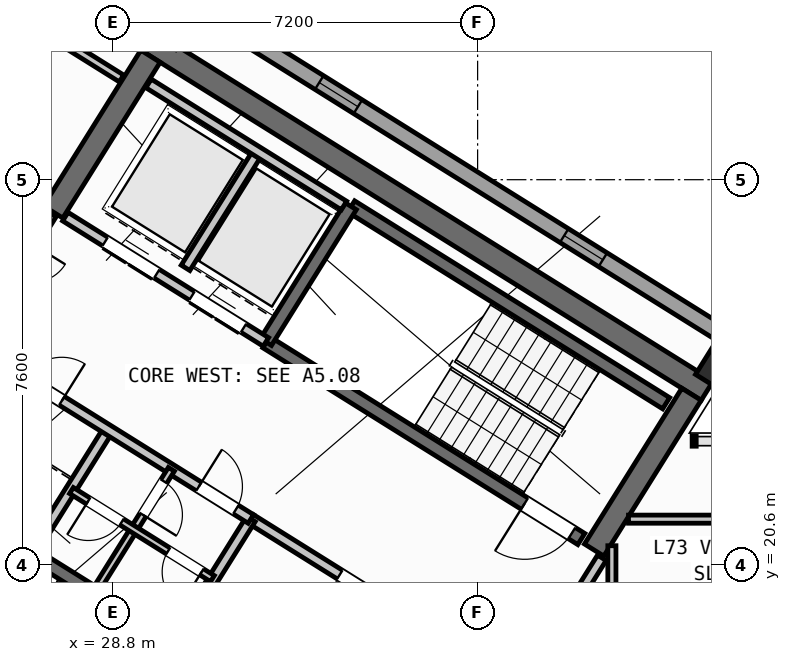
"""IFC4 building model, lengths in metres.
Left out: names, types, materials, properties, quantities, classifications, styles, units other than length and angle.
Written with IfcOpenShell. Run it as: python <this file> out.ifc"""

import sys

from ifc_helpers import new_model, si_unit, direction, frame, frame_2d, origin, origin_2d, place, context, subcontext, project, spatial, rectangle, hollow_rectangle, extrude, source, transform, mapped, element, fill, save


model = new_model("IFC4")
c1 = context("Model", 3, precision=1e-05, world=origin(), true_north=direction((0.0, 1.0)))
c2 = subcontext(c1, "Body", "Model", "MODEL_VIEW")
j1 = project(units=[si_unit("LENGTHUNIT", "METRE"), si_unit("PLANEANGLEUNIT", "RADIAN")], contexts=[c1])
p1 = place(None, origin())
s1 = spatial("IfcSite", under=j1, at=p1, CompositionType="ELEMENT")
p2 = place(p1, origin())
s2 = spatial("IfcBuilding", under=s1, at=p2, CompositionType="ELEMENT")
p3 = place(p2, frame((0.0, 0.0, 288.0)))
s3 = spatial("IfcBuildingStorey", under=s2, at=p3, CompositionType="ELEMENT", Elevation=288.0)
p4 = place(p3, frame((40.531, 24.036, 0.0), z_axis=(0.0, 0.0, 1.0), x_axis=(-0.848048787466, 0.529918157905, 0.0)))
e1 = element("IfcWall", 1, at=p4, inside=s3, PredefinedType="SHEAR", context=c2, shape_type="SweptSolid", body=[
    extrude(rectangle(XDim=13.04, YDim=0.45, at=frame_2d((6.52, 0.0))), origin(), (0.0, 0.0, 1.0), 3.35),
])
for number, where, z_axis, x_axis in (
    (2, (40.221, 23.965, 0.0), (0.0, 0.0, 1.0), (-0.53, -0.848, 0.0)),
    (3, (29.544, 30.636, 0.0), (0.0, 0.0, 1.0), (-0.53, -0.848, 0.0)),
):
    element("IfcWall", number, at=place(p3, frame(where, z_axis=z_axis, x_axis=x_axis)), inside=s3, PredefinedType="SHEAR", context=c2, shape_type="SweptSolid", body=[
        extrude(rectangle(XDim=3.625, YDim=0.45, at=frame_2d((1.812, 0.0))), origin(), (0.0, 0.0, 1.0), 3.35),
    ])
m1 = source(origin(), c2, "Body", "SweptSolid", [
    extrude(hollow_rectangle(XDim=0.7, YDim=0.7, WallThickness=0.028, at=origin_2d()), origin(), (0.0, 0.0, 1.0), 3.6),
])
p5 = place(p3, frame((40.783, 24.469, 0.0), z_axis=(0.0, 0.0, 1.0), x_axis=(-0.848048096156, 0.529919264233, 0.0)))
e4 = element("IfcColumn", 4, at=p5, inside=s3, PredefinedType="COLUMN", context=c2, shape_type="MappedRepresentation", body=[
    mapped(m1, transform((0.0, 0.0, 0.0), scale=1.0)),
])
p6 = place(p3, frame((19.566, 38.434, 0.0), z_axis=(0.0, 0.0, 1.0), x_axis=(0.84804567626, -0.529923136858, 0.0)))
e5 = element("IfcWall", 5, at=p6, inside=s3, PredefinedType="STANDARD", context=c2, shape_type="SweptSolid", body=[
    extrude(rectangle(XDim=25.188, YDim=0.32, at=frame_2d((12.594, 0.0))), origin(), (0.0, 0.0, 1.0), 3.35),
])
p7 = place(p6, frame((3.355, 0.0, 0.0)))
e6 = element("IfcOpeningElement", 6, at=p7, cuts=e5, PredefinedType="OPENING", context=c2, shape_type="SweptSolid", body=[
    extrude(rectangle(XDim=1.05, YDim=2.15, at=frame_2d((0.525, 1.075))), frame((0.0, 0.17, 0.0), z_axis=(0.0, -1.0, 0.0), x_axis=(1.0, 0.0, 0.0)), (0.0, 0.0, 1.0), 0.34),
])
p8 = place(p6, frame((0.939, 0.0, 0.9)))
e7 = element("IfcOpeningElement", 7, at=p8, cuts=e5, PredefinedType="OPENING", context=c2, shape_type="SweptSolid", body=[
    extrude(rectangle(XDim=1.65, YDim=1.45, at=frame_2d((0.825, 0.725))), frame((0.0, 0.17, 0.0), z_axis=(0.0, -1.0, 0.0), x_axis=(1.0, 0.0, 0.0)), (0.0, 0.0, 1.0), 0.34),
])
p9 = place(p6, frame((7.499, 0.0, 0.9)))
e8 = element("IfcOpeningElement", 8, at=p9, cuts=e5, PredefinedType="OPENING", context=c2, shape_type="SweptSolid", body=[
    extrude(rectangle(XDim=1.35, YDim=1.45, at=frame_2d((0.675, 0.725))), frame((0.0, 0.17, 0.0), z_axis=(0.0, -1.0, 0.0), x_axis=(1.0, 0.0, 0.0)), (0.0, 0.0, 1.0), 0.34),
])
p10 = place(p6, frame((10.754, 0.0, 1.0)))
e9 = element("IfcOpeningElement", 9, at=p10, cuts=e5, PredefinedType="OPENING", context=c2, shape_type="SweptSolid", body=[
    extrude(rectangle(XDim=0.9, YDim=1.25, at=frame_2d((0.45, 0.625))), frame((0.0, 0.17, 0.0), z_axis=(0.0, -1.0, 0.0), x_axis=(1.0, 0.0, 0.0)), (0.0, 0.0, 1.0), 0.34),
])
p11 = place(p6, frame((15.694, 0.0, 1.0)))
e10 = element("IfcOpeningElement", 10, at=p11, cuts=e5, PredefinedType="OPENING", context=c2, shape_type="SweptSolid", body=[
    extrude(rectangle(XDim=0.9, YDim=1.25, at=frame_2d((0.45, 0.625))), frame((0.0, 0.17, 0.0), z_axis=(0.0, -1.0, 0.0), x_axis=(1.0, 0.0, 0.0)), (0.0, 0.0, 1.0), 0.34),
])
p12 = place(p6, frame((21.394, 0.0, 1.0)))
e11 = element("IfcOpeningElement", 11, at=p12, cuts=e5, PredefinedType="OPENING", context=c2, shape_type="SweptSolid", body=[
    extrude(rectangle(XDim=0.9, YDim=1.25, at=frame_2d((0.45, 0.625))), frame((0.0, 0.17, 0.0), z_axis=(0.0, -1.0, 0.0), x_axis=(1.0, 0.0, 0.0)), (0.0, 0.0, 1.0), 0.34),
])
p13 = place(p3, frame((31.28, 18.261, 0.0), z_axis=(0.0, 0.0, 1.0), x_axis=(-0.848051618787, 0.529913626805, 0.0)))
e12 = element("IfcWall", 12, at=p13, inside=s3, PredefinedType="SHEAR", context=c2, shape_type="SweptSolid", body=[
    extrude(rectangle(XDim=7.46, YDim=0.26, at=frame_2d((3.73, 0.0))), origin(), (0.0, 0.0, 1.0), 3.35),
])
p14 = place(p13, frame((0.36, 0.0, 0.0)))
e13 = element("IfcOpeningElement", 13, at=p14, cuts=e12, PredefinedType="OPENING", context=c2, shape_type="SweptSolid", body=[
    extrude(rectangle(XDim=0.86, YDim=2.05, at=frame_2d((0.43, 1.025))), frame((0.0, 0.14, 0.0), z_axis=(0.0, -1.0, 0.0), x_axis=(1.0, 0.0, 0.0)), (0.0, 0.0, 1.0), 0.28),
])
p15 = place(p3, frame((39.721, 23.788, 0.0), z_axis=(0.0, 0.0, 1.0), x_axis=(-0.848054434086, 0.529909121291, 0.0)))
e14 = element("IfcWall", 14, at=p15, inside=s3, PredefinedType="SHEAR", context=c2, shape_type="SweptSolid", body=[
    extrude(rectangle(XDim=7.33, YDim=0.26, at=frame_2d((3.665, 0.0))), origin(), (0.0, 0.0, 1.0), 3.35),
])
p16 = place(p3, frame((38.046, 21.108, 0.0), z_axis=(0.0, 0.0, 1.0), x_axis=(-0.848054434086, 0.529909121291, 0.0)))
e15 = element("IfcWall", 15, at=p16, inside=s3, PredefinedType="SHEAR", context=c2, shape_type="SweptSolid", body=[
    extrude(rectangle(XDim=7.33, YDim=0.26, at=frame_2d((3.665, 0.0))), origin(), (0.0, 0.0, 1.0), 3.35),
])
p17 = place(p16, frame((0.22, 0.0, 0.0)))
e16 = element("IfcOpeningElement", 16, at=p17, cuts=e15, PredefinedType="OPENING", context=c2, shape_type="SweptSolid", body=[
    extrude(rectangle(XDim=1.1, YDim=2.1, at=frame_2d((0.55, 1.05))), frame((0.0, 0.14, 0.0), z_axis=(0.0, -1.0, 0.0), x_axis=(1.0, 0.0, 0.0)), (0.0, 0.0, 1.0), 0.28),
])
p18 = place(p3, frame((33.496, 27.677, 0.0), z_axis=(0.0, 0.0, 1.0), x_axis=(-0.529908658664, -0.84805472316, 0.0)))
e17 = element("IfcWall", 17, at=p18, inside=s3, PredefinedType="SHEAR", context=c2, shape_type="SweptSolid", body=[
    extrude(rectangle(XDim=3.16, YDim=0.26, at=frame_2d((1.58, 0.0))), origin(), (0.0, 0.0, 1.0), 3.35),
])
p19 = place(p3, frame((36.459, 18.421, 0.0), z_axis=(0.0, 0.0, 1.0), x_axis=(-0.848059591691, 0.529900867089, 0.0)))
e18 = element("IfcWall", 18, at=p19, inside=s3, PredefinedType="STANDARD", context=c2, shape_type="SweptSolid", body=[
    extrude(rectangle(XDim=5.818, YDim=0.2, at=frame_2d((2.909, 0.0))), origin(), (0.0, 0.0, 1.0), 3.34),
])
p20 = place(p19, frame((2.598, 0.0, 0.0)))
e19 = element("IfcOpeningElement", 19, at=p20, cuts=e18, PredefinedType="OPENING", context=c2, shape_type="SweptSolid", body=[
    extrude(rectangle(XDim=1.15, YDim=2.1, at=frame_2d((0.575, 1.05))), frame((0.0, 0.11, 0.0), z_axis=(0.0, -1.0, 0.0), x_axis=(1.0, 0.0, 0.0)), (0.0, 0.0, 1.0), 0.22),
])
p21 = place(p3, frame((31.822, 24.998, 0.0), z_axis=(0.0, 0.0, 1.0), x_axis=(-0.848054125777, 0.529909614701, 0.0)))
e20 = element("IfcWall", 20, at=p21, inside=s3, PredefinedType="STANDARD", context=c2, shape_type="SweptSolid", body=[
    extrude(rectangle(XDim=4.668, YDim=0.2, at=frame_2d((2.334, 0.0))), origin(), (0.0, 0.0, 1.0), 3.34),
])
p22 = place(p21, frame((0.52, 0.0, 0.0)))
e21 = element("IfcOpeningElement", 21, at=p22, cuts=e20, PredefinedType="OPENING", context=c2, shape_type="SweptSolid", body=[
    extrude(rectangle(XDim=1.2, YDim=2.15, at=frame_2d((0.6, 1.075))), frame((0.0, 0.11, 0.0), z_axis=(0.0, -1.0, 0.0), x_axis=(1.0, 0.0, 0.0)), (0.0, 0.0, 1.0), 0.22),
])
p23 = place(p21, frame((2.54, 0.0, 0.0)))
e22 = element("IfcOpeningElement", 22, at=p23, cuts=e20, PredefinedType="OPENING", context=c2, shape_type="SweptSolid", body=[
    extrude(rectangle(XDim=1.2, YDim=2.15, at=frame_2d((0.6, 1.075))), frame((0.0, 0.11, 0.0), z_axis=(0.0, -1.0, 0.0), x_axis=(1.0, 0.0, 0.0)), (0.0, 0.0, 1.0), 0.22),
])
p24 = place(p3, frame((31.645, 28.716, 0.0), z_axis=(0.0, 0.0, 1.0), x_axis=(-0.52986693015, -0.848080795876, 0.0)))
e23 = element("IfcWall", 23, at=p24, inside=s3, PredefinedType="STANDARD", context=c2, shape_type="SweptSolid", body=[
    extrude(rectangle(XDim=2.66, YDim=0.2, at=frame_2d((1.33, 0.0))), origin(), (0.0, 0.0, 1.0), 3.34),
])
p25 = place(p3, frame((33.363, 27.69, 0.0), z_axis=(0.0, 0.0, 1.0), x_axis=(-0.84804957148, 0.529916903215, 0.0)))
e24 = element("IfcWall", 24, at=p25, inside=s3, PredefinedType="STANDARD", context=c2, shape_type="SweptSolid", body=[
    extrude(rectangle(XDim=4.548, YDim=0.2, at=frame_2d((2.274, 0.0))), origin(), (0.0, 0.0, 1.0), 3.34),
])
for number, where, z_axis, x_axis in (
    (25, (31.525, 21.504, 0.0), (0.0, 0.0, 1.0), (-0.53, -0.848, 0.0)),
    (26, (28.71, 23.263, 0.0), (0.0, 0.0, 1.0), (-0.53, -0.848, 0.0)),
):
    element("IfcWall", number, at=place(p3, frame(where, z_axis=z_axis, x_axis=x_axis)), inside=s3, PredefinedType="STANDARD", context=c2, shape_type="SweptSolid", body=[
        extrude(rectangle(XDim=2.88, YDim=0.2, at=frame_2d((1.44, 0.0))), origin(), (0.0, 0.0, 1.0), 3.34),
    ])
p26 = place(p3, frame((31.525, 21.504, 0.0), z_axis=(0.0, 0.0, 1.0), x_axis=(-0.848042066329, 0.529928913853, 0.0)))
e27 = element("IfcWall", 27, at=p26, inside=s3, PredefinedType="STANDARD", context=c2, shape_type="SweptSolid", body=[
    extrude(rectangle(XDim=6.268, YDim=0.2, at=frame_2d((3.134, 0.0))), origin(), (0.0, 0.0, 1.0), 3.34),
])
p27 = place(p26, frame((4.4, 0.0, 0.0)))
e28 = element("IfcOpeningElement", 28, at=p27, cuts=e27, PredefinedType="OPENING", context=c2, shape_type="SweptSolid", body=[
    extrude(rectangle(XDim=0.86, YDim=2.05, at=frame_2d((0.43, 1.025))), frame((0.0, 0.11, 0.0), z_axis=(0.0, -1.0, 0.0), x_axis=(1.0, 0.0, 0.0)), (0.0, 0.0, 1.0), 0.22),
])
p28 = place(p26, frame((0.35, 0.0, 0.0)))
e29 = element("IfcOpeningElement", 29, at=p28, cuts=e27, PredefinedType="OPENING", context=c2, shape_type="SweptSolid", body=[
    extrude(rectangle(XDim=0.86, YDim=2.05, at=frame_2d((0.43, 1.025))), frame((0.0, 0.11, 0.0), z_axis=(0.0, -1.0, 0.0), x_axis=(1.0, 0.0, 0.0)), (0.0, 0.0, 1.0), 0.22),
])
p29 = place(p3, frame((29.956, 22.484, 0.0), z_axis=(0.0, 0.0, 1.0), x_axis=(-0.529951914384, -0.848027693204, 0.0)))
e30 = element("IfcWall", 30, at=p29, inside=s3, PredefinedType="PLUMBINGWALL", context=c2, shape_type="SweptSolid", body=[
    extrude(rectangle(XDim=1.4, YDim=0.14, at=frame_2d((0.7, 0.0))), origin(), (0.0, 0.0, 1.0), 3.34),
])
p30 = place(p29, frame((0.28, 0.0, 0.0)))
e31 = element("IfcOpeningElement", 31, at=p30, cuts=e30, PredefinedType="OPENING", context=c2, shape_type="SweptSolid", body=[
    extrude(rectangle(XDim=0.78, YDim=2.05, at=frame_2d((0.39, 1.025))), frame((0.0, 0.08, 0.0), z_axis=(0.0, -1.0, 0.0), x_axis=(1.0, 0.0, 0.0)), (0.0, 0.0, 1.0), 0.16),
])
p31 = place(p3, frame((29.214, 21.297, 0.0), z_axis=(0.0, 0.0, 1.0), x_axis=(-0.529865479138, -0.848081702443, 0.0)))
e32 = element("IfcWall", 32, at=p31, inside=s3, PredefinedType="PLUMBINGWALL", context=c2, shape_type="SweptSolid", body=[
    extrude(rectangle(XDim=1.48, YDim=0.14, at=frame_2d((0.74, 0.0))), origin(), (0.0, 0.0, 1.0), 3.34),
])
p32 = place(p3, frame((30.766, 20.327, 0.0), z_axis=(0.0, 0.0, 1.0), x_axis=(-0.848052663127, 0.529911955482, 0.0)))
e33 = element("IfcWall", 33, at=p32, inside=s3, PredefinedType="PLUMBINGWALL", context=c2, shape_type="SweptSolid", body=[
    extrude(rectangle(XDim=3.28, YDim=0.14, at=frame_2d((1.64, 0.0))), origin(), (0.0, 0.0, 1.0), 3.34),
])
p33 = place(p32, frame((0.25, 0.0, 0.0)))
e34 = element("IfcOpeningElement", 34, at=p33, cuts=e33, PredefinedType="OPENING", context=c2, shape_type="SweptSolid", body=[
    extrude(rectangle(XDim=0.78, YDim=2.05, at=frame_2d((0.39, 1.025))), frame((0.0, 0.08, 0.0), z_axis=(0.0, -1.0, 0.0), x_axis=(1.0, 0.0, 0.0)), (0.0, 0.0, 1.0), 0.16),
])
p34 = place(p32, frame((2.11, 0.0, 0.0)))
e35 = element("IfcOpeningElement", 35, at=p34, cuts=e33, PredefinedType="OPENING", context=c2, shape_type="SweptSolid", body=[
    extrude(rectangle(XDim=0.78, YDim=2.05, at=frame_2d((0.39, 1.025))), frame((0.0, 0.08, 0.0), z_axis=(0.0, -1.0, 0.0), x_axis=(1.0, 0.0, 0.0)), (0.0, 0.0, 1.0), 0.16),
])
p35 = place(p3, frame((27.596, 27.52, 0.0), z_axis=(0.0, 0.0, 1.0), x_axis=(-0.529865479138, -0.848081702443, 0.0)))
e36 = element("IfcWall", 36, at=p35, inside=s3, PredefinedType="STANDARD", context=c2, shape_type="SweptSolid", body=[
    extrude(rectangle(XDim=2.96, YDim=0.2, at=frame_2d((1.48, 0.0))), origin(), (0.0, 0.0, 1.0), 3.34),
])
p36 = place(p35, frame((0.7, 0.0, 0.0)))
e37 = element("IfcOpeningElement", 37, at=p36, cuts=e36, PredefinedType="OPENING", context=c2, shape_type="SweptSolid", body=[
    extrude(rectangle(XDim=1.5, YDim=2.15, at=frame_2d((0.75, 1.075))), frame((0.0, 0.11, 0.0), z_axis=(0.0, -1.0, 0.0), x_axis=(1.0, 0.0, 0.0)), (0.0, 0.0, 1.0), 0.22),
])
p37 = place(p3, frame((28.972, 30.198, 0.0), z_axis=(0.0, 0.0, 1.0), x_axis=(-0.848015752453, 0.529971021464, 0.0)))
e38 = element("IfcWall", 38, at=p37, inside=s3, PredefinedType="PARTITIONING", context=c2, shape_type="SweptSolid", body=[
    extrude(rectangle(XDim=2.358, YDim=0.16, at=frame_2d((1.179, 0.0))), origin(), (0.0, 0.0, 1.0), 3.34),
])
p38 = place(p3, frame((38.451, 20.737, 0.0), z_axis=(0.0, 0.0, 1.0), x_axis=(-0.529924799939, -0.848044637038, 0.0)))
e39 = element("IfcWall", 39, at=p38, inside=s3, PredefinedType="STANDARD", context=c2, shape_type="SweptSolid", body=[
    extrude(rectangle(XDim=2.96, YDim=0.2, at=frame_2d((1.48, 0.0))), origin(), (0.0, 0.0, 1.0), 3.34),
])
p39 = place(p38, frame((1.46, 0.0, 0.0)))
e40 = element("IfcOpeningElement", 40, at=p39, cuts=e39, PredefinedType="OPENING", context=c2, shape_type="SweptSolid", body=[
    extrude(rectangle(XDim=0.86, YDim=2.05, at=frame_2d((0.43, 1.025))), frame((0.0, 0.11, 0.0), z_axis=(0.0, -1.0, 0.0), x_axis=(1.0, 0.0, 0.0)), (0.0, 0.0, 1.0), 0.22),
])
p40 = place(p3, frame((38.65, 17.93, 0.0), z_axis=(0.0, 0.0, 1.0), x_axis=(0.0, 1.0, 0.0)))
e41 = element("IfcWall", 41, at=p40, inside=s3, PredefinedType="PARTITIONING", context=c2, shape_type="SweptSolid", body=[
    extrude(rectangle(XDim=3.046, YDim=0.16, at=frame_2d((1.523, 0.0))), origin(), (0.0, 0.0, 1.0), 3.34),
])
p41 = place(p3, frame((38.978, 21.5, 0.0), z_axis=(0.0, 0.0, 1.0), x_axis=(1.0, 0.0, 0.0)))
e42 = element("IfcWall", 42, at=p41, inside=s3, PredefinedType="PARTITIONING", context=c2, shape_type="SweptSolid", body=[
    extrude(rectangle(XDim=3.823, YDim=0.16, at=frame_2d((1.911, 0.0))), origin(), (0.0, 0.0, 1.0), 3.34),
])
m2 = source(origin(), c2, "Body", "SweptSolid", [
    extrude(rectangle(XDim=0.9, YDim=1.25, at=frame_2d((0.45, 0.625))), frame((0.0, 0.03, 0.0), z_axis=(0.0, -1.0, 0.0), x_axis=(1.0, 0.0, 0.0)), (0.0, 0.0, 1.0), 0.06),
])
p42 = place(p11, origin())
e43 = element("IfcWindow", 43, at=p42, inside=s3, PartitioningType="SINGLE_PANEL", PredefinedType="WINDOW", context=c2, shape_type="MappedRepresentation", body=[
    mapped(m2, transform((0.0, 0.0, 0.0), scale=1.0)),
])
fill(e10, e43)
p43 = place(p12, origin())
e44 = element("IfcWindow", 44, at=p43, inside=s3, PartitioningType="SINGLE_PANEL", PredefinedType="WINDOW", context=c2, shape_type="MappedRepresentation", body=[
    mapped(m2, transform((0.0, 0.0, 0.0), scale=1.0)),
])
fill(e11, e44)
m3 = source(origin(), c2, "Body", "SweptSolid", [
    extrude(rectangle(XDim=1.1, YDim=2.1, at=frame_2d((0.55, 1.05))), frame((0.0, 0.025, 0.0), z_axis=(0.0, -1.0, 0.0), x_axis=(1.0, 0.0, 0.0)), (0.0, 0.0, 1.0), 0.05),
])
p44 = place(p17, origin())
e45 = element("IfcDoor", 45, at=p44, inside=s3, OperationType="SINGLE_SWING_RIGHT", PredefinedType="DOOR", context=c2, shape_type="MappedRepresentation", body=[
    mapped(m3, transform((0.0, 0.0, 0.0), scale=1.0)),
])
fill(e16, e45)
m4 = source(origin(), c2, "Body", "SweptSolid", [
    extrude(rectangle(XDim=1.15, YDim=2.1, at=frame_2d((0.575, 1.05))), frame((0.0, 0.025, 0.0), z_axis=(0.0, -1.0, 0.0), x_axis=(1.0, 0.0, 0.0)), (0.0, 0.0, 1.0), 0.05),
])
p45 = place(p20, origin())
e46 = element("IfcDoor", 46, at=p45, inside=s3, OperationType="SINGLE_SWING_LEFT", PredefinedType="DOOR", context=c2, shape_type="MappedRepresentation", body=[
    mapped(m4, transform((0.0, 0.0, 0.0), scale=1.0)),
])
fill(e19, e46)
m5 = source(origin(), c2, "Body", "SweptSolid", [
    extrude(rectangle(XDim=1.2, YDim=2.15, at=frame_2d((0.6, 1.075))), frame((0.0, 0.025, 0.0), z_axis=(0.0, -1.0, 0.0), x_axis=(1.0, 0.0, 0.0)), (0.0, 0.0, 1.0), 0.05),
])
p46 = place(p22, origin())
e47 = element("IfcDoor", 47, at=p46, inside=s3, OperationType="DOUBLE_DOOR_SLIDING", PredefinedType="DOOR", context=c2, shape_type="MappedRepresentation", body=[
    mapped(m5, transform((0.0, 0.0, 0.0), scale=1.0)),
])
fill(e21, e47)
p47 = place(p23, origin())
e48 = element("IfcDoor", 48, at=p47, inside=s3, OperationType="DOUBLE_DOOR_SLIDING", PredefinedType="DOOR", context=c2, shape_type="MappedRepresentation", body=[
    mapped(m5, transform((0.0, 0.0, 0.0), scale=1.0)),
])
fill(e22, e48)
m6 = source(origin(), c2, "Body", "SweptSolid", [
    extrude(rectangle(XDim=0.86, YDim=2.05, at=frame_2d((0.43, 1.025))), frame((0.0, 0.025, 0.0), z_axis=(0.0, -1.0, 0.0), x_axis=(1.0, 0.0, 0.0)), (0.0, 0.0, 1.0), 0.05),
])
p48 = place(p27, frame((0.86, 0.0, 0.0), z_axis=(0.0, 0.0, 1.0), x_axis=(-1.0, 0.0, 0.0)))
e49 = element("IfcDoor", 49, at=p48, inside=s3, OperationType="SINGLE_SWING_RIGHT", PredefinedType="DOOR", context=c2, shape_type="MappedRepresentation", body=[
    mapped(m6, transform((0.0, 0.0, 0.0), scale=1.0)),
])
fill(e28, e49)
p49 = place(p28, frame((0.86, 0.0, 0.0), z_axis=(0.0, 0.0, 1.0), x_axis=(-1.0, 0.0, 0.0)))
e50 = element("IfcDoor", 50, at=p49, inside=s3, OperationType="SINGLE_SWING_LEFT", PredefinedType="DOOR", context=c2, shape_type="MappedRepresentation", body=[
    mapped(m6, transform((0.0, 0.0, 0.0), scale=1.0)),
])
fill(e29, e50)
m7 = source(origin(), c2, "Body", "SweptSolid", [
    extrude(rectangle(XDim=0.78, YDim=2.05, at=frame_2d((0.39, 1.025))), frame((0.0, 0.025, 0.0), z_axis=(0.0, -1.0, 0.0), x_axis=(1.0, 0.0, 0.0)), (0.0, 0.0, 1.0), 0.05),
])
p50 = place(p30, origin())
e51 = element("IfcDoor", 51, at=p50, inside=s3, OperationType="SINGLE_SWING_RIGHT", PredefinedType="DOOR", context=c2, shape_type="MappedRepresentation", body=[
    mapped(m7, transform((0.0, 0.0, 0.0), scale=1.0)),
])
fill(e31, e51)
p51 = place(p33, origin())
e52 = element("IfcDoor", 52, at=p51, inside=s3, OperationType="SINGLE_SWING_LEFT", PredefinedType="DOOR", context=c2, shape_type="MappedRepresentation", body=[
    mapped(m7, transform((0.0, 0.0, 0.0), scale=1.0)),
])
fill(e34, e52)
p52 = place(p34, origin())
e53 = element("IfcDoor", 53, at=p52, inside=s3, OperationType="SINGLE_SWING_RIGHT", PredefinedType="DOOR", context=c2, shape_type="MappedRepresentation", body=[
    mapped(m7, transform((0.0, 0.0, 0.0), scale=1.0)),
])
fill(e35, e53)
save(model, sys.argv[1])
